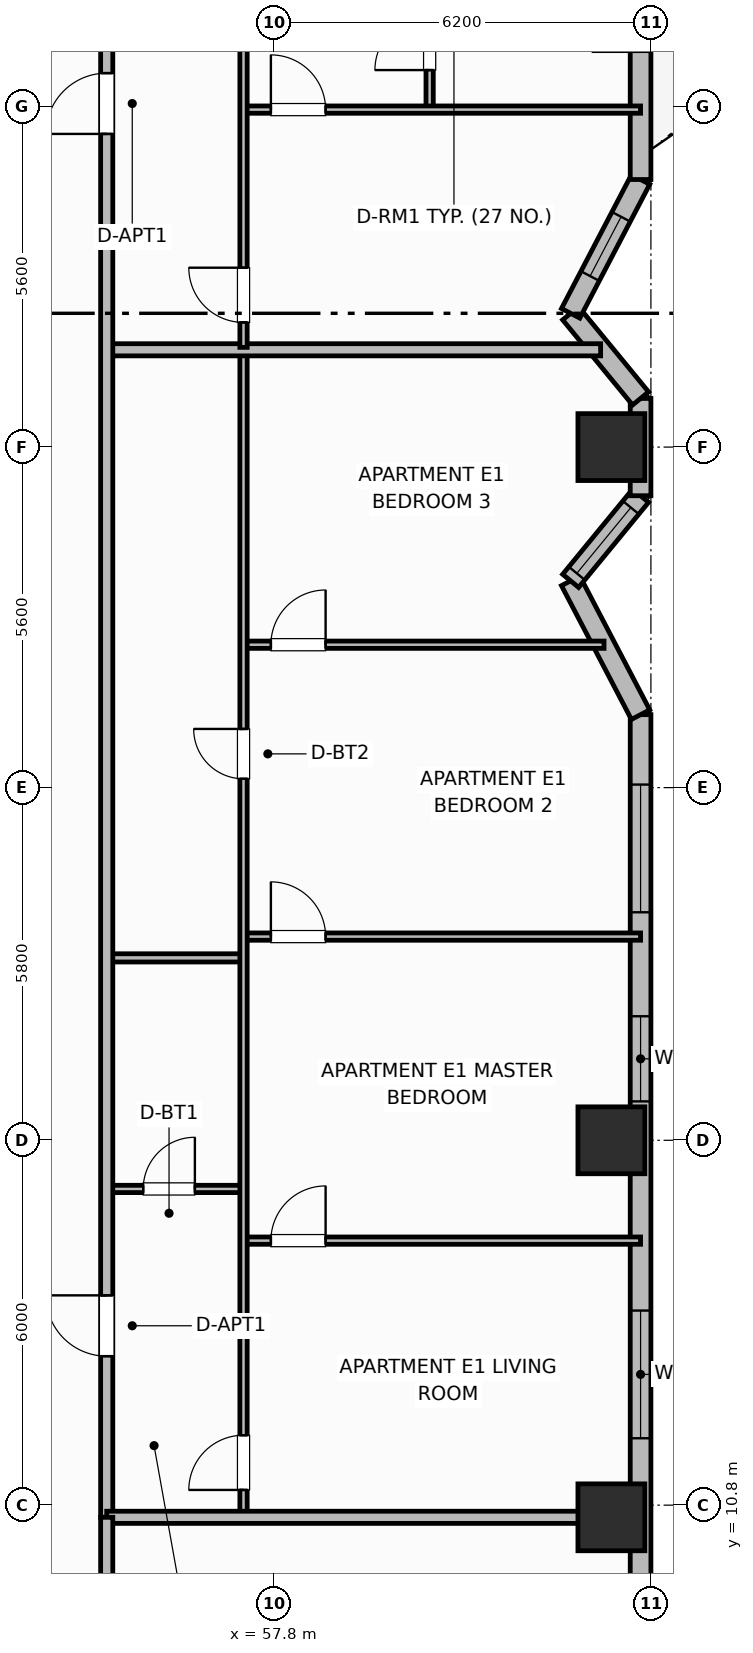
"""IFC4 building model, lengths in metres.
Left out: names, types, materials, properties, quantities, classifications, styles, units other than length and angle.
Written with IfcOpenShell. Run it as: python <this file> out.ifc"""

import sys

from ifc_helpers import new_model, si_unit, direction, frame, frame_2d, origin, origin_2d, place, context, subcontext, project, spatial, rectangle, extrude, element, fill, save


model = new_model("IFC4")
c1 = context("Model", 3, precision=1e-05, world=origin(), true_north=direction((0.0, 1.0)))
c2 = subcontext(c1, "Body", "Model", "MODEL_VIEW")
j1 = project(units=[si_unit("LENGTHUNIT", "METRE"), si_unit("PLANEANGLEUNIT", "RADIAN")], contexts=[c1])
p1 = place(None, origin())
s1 = spatial("IfcSite", under=j1, at=p1, CompositionType="ELEMENT")
p2 = place(p1, origin())
s2 = spatial("IfcBuilding", under=s1, at=p2, CompositionType="ELEMENT")
p3 = place(p2, frame((0.0, 0.0, 132.7)))
s3 = spatial("IfcBuildingStorey", under=s2, at=p3, CompositionType="ELEMENT", Elevation=132.7)
for number, where, z_axis, x_axis in (
    (1, (63.35, 10.6, 0.0), (0.0, 0.0, 1.0), (1.0, 0.0, 0.0)),
    (2, (63.35, 16.8, 0.0), (0.0, 0.0, 1.0), (1.0, 0.0, 0.0)),
    (3, (63.35, 28.2, 0.0), (0.0, 0.0, 1.0), (1.0, 0.0, 0.0)),
):
    element("IfcColumn", number, at=place(p3, frame(where, z_axis=z_axis, x_axis=x_axis)), inside=s3, PredefinedType="COLUMN", context=c2, shape_type="SweptSolid", body=[
        extrude(rectangle(XDim=1.1, YDim=1.1, at=origin_2d()), origin(), (0.0, 0.0, 1.0), 3.7),
    ])
p4 = place(p3, frame((63.83, 9.0, 0.0), z_axis=(0.0, 0.0, 1.0), x_axis=(0.0, 1.0, 0.0)))
e4 = element("IfcWall", 4, at=p4, inside=s3, PredefinedType="SOLIDWALL", context=c2, shape_type="SweptSolid", body=[
    extrude(rectangle(XDim=14.8, YDim=0.34, at=frame_2d((7.4, 0.0))), origin(), (0.0, 0.0, 1.0), 2.66),
])
p5 = place(p4, frame((2.9, 0.0, 0.64)))
e5 = element("IfcOpeningElement", 5, at=p5, cuts=e4, PredefinedType="OPENING", context=c2, shape_type="SweptSolid", body=[
    extrude(rectangle(XDim=2.1, YDim=1.9, at=frame_2d((1.05, 0.95))), frame((0.0, 0.18, 0.0), z_axis=(0.0, -1.0, 0.0), x_axis=(1.0, 0.0, 0.0)), (0.0, 0.0, 1.0), 0.36),
])
p6 = place(p4, frame((8.44, 0.0, 0.65)))
e6 = element("IfcOpeningElement", 6, at=p6, cuts=e4, PredefinedType="OPENING", context=c2, shape_type="SweptSolid", body=[
    extrude(rectangle(XDim=1.4, YDim=1.85, at=frame_2d((0.7, 0.925))), frame((0.0, 0.18, 0.0), z_axis=(0.0, -1.0, 0.0), x_axis=(1.0, 0.0, 0.0)), (0.0, 0.0, 1.0), 0.36),
])
p7 = place(p4, frame((11.55, 0.0, 0.64)))
e7 = element("IfcOpeningElement", 7, at=p7, cuts=e4, PredefinedType="OPENING", context=c2, shape_type="SweptSolid", body=[
    extrude(rectangle(XDim=2.1, YDim=1.9, at=frame_2d((1.05, 0.95))), frame((0.0, 0.18, 0.0), z_axis=(0.0, -1.0, 0.0), x_axis=(1.0, 0.0, 0.0)), (0.0, 0.0, 1.0), 0.36),
])
p8 = place(p3, frame((63.83, 23.8, 0.0), z_axis=(0.0, 0.0, 1.0), x_axis=(-0.463308627993, 0.886196995722, 0.0)))
e8 = element("IfcWall", 8, at=p8, inside=s3, PredefinedType="SOLIDWALL", context=c2, shape_type="SweptSolid", body=[
    extrude(rectangle(XDim=2.482, YDim=0.34, at=frame_2d((1.241, 0.0))), origin(), (0.0, 0.0, 1.0), 2.66),
])
p9 = place(p3, frame((62.68, 26.0, 0.0), z_axis=(0.0, 0.0, 1.0), x_axis=(0.634814134075, 0.772664878961, 0.0)))
e9 = element("IfcWall", 9, at=p9, inside=s3, PredefinedType="SOLIDWALL", context=c2, shape_type="SweptSolid", body=[
    extrude(rectangle(XDim=1.812, YDim=0.34, at=frame_2d((0.906, 0.0))), origin(), (0.0, 0.0, 1.0), 2.66),
])
p10 = place(p9, frame((0.16, 0.0, 0.65)))
e10 = element("IfcOpeningElement", 10, at=p10, cuts=e9, PredefinedType="OPENING", context=c2, shape_type="SweptSolid", body=[
    extrude(rectangle(XDim=1.4, YDim=1.85, at=frame_2d((0.7, 0.925))), frame((0.0, 0.18, 0.0), z_axis=(0.0, -1.0, 0.0), x_axis=(1.0, 0.0, 0.0)), (0.0, 0.0, 1.0), 0.36),
])
p11 = place(p3, frame((63.83, 27.4, 0.0), z_axis=(0.0, 0.0, 1.0), x_axis=(0.0, 1.0, 0.0)))
e11 = element("IfcWall", 11, at=p11, inside=s3, PredefinedType="SOLIDWALL", context=c2, shape_type="SweptSolid", body=[
    extrude(rectangle(XDim=1.6, YDim=0.34, at=frame_2d((0.8, 0.0))), origin(), (0.0, 0.0, 1.0), 2.66),
])
p12 = place(p3, frame((63.83, 29.0, 0.0), z_axis=(0.0, 0.0, 1.0), x_axis=(-0.634814134075, 0.772664878961, 0.0)))
e12 = element("IfcWall", 12, at=p12, inside=s3, PredefinedType="SOLIDWALL", context=c2, shape_type="SweptSolid", body=[
    extrude(rectangle(XDim=1.812, YDim=0.34, at=frame_2d((0.906, 0.0))), origin(), (0.0, 0.0, 1.0), 2.66),
])
p13 = place(p3, frame((62.68, 30.4, 0.0), z_axis=(0.0, 0.0, 1.0), x_axis=(0.46326825181, 0.88621810344, 0.0)))
e13 = element("IfcWall", 13, at=p13, inside=s3, PredefinedType="SOLIDWALL", context=c2, shape_type="SweptSolid", body=[
    extrude(rectangle(XDim=2.483, YDim=0.34, at=frame_2d((1.241, 0.0))), origin(), (0.0, 0.0, 1.0), 2.66),
])
p14 = place(p13, frame((0.691, 0.0, 0.85)))
e14 = element("IfcOpeningElement", 14, at=p14, cuts=e13, PredefinedType="OPENING", context=c2, shape_type="SweptSolid", body=[
    extrude(rectangle(XDim=1.1, YDim=1.65, at=frame_2d((0.55, 0.825))), frame((0.0, 0.18, 0.0), z_axis=(0.0, -1.0, 0.0), x_axis=(1.0, 0.0, 0.0)), (0.0, 0.0, 1.0), 0.36),
])
p15 = place(p3, frame((63.83, 32.6, 0.0), z_axis=(0.0, 0.0, 1.0), x_axis=(0.0, 1.0, 0.0)))
e15 = element("IfcWall", 15, at=p15, inside=s3, PredefinedType="SOLIDWALL", context=c2, shape_type="SweptSolid", body=[
    extrude(rectangle(XDim=14.8, YDim=0.34, at=frame_2d((7.4, 0.0))), origin(), (0.0, 0.0, 1.0), 2.66),
])
p16 = place(p15, frame((2.1, 0.0, 0.0)))
e16 = element("IfcOpeningElement", 16, at=p16, cuts=e15, PredefinedType="OPENING", context=c2, shape_type="SweptSolid", body=[
    extrude(rectangle(XDim=1.6, YDim=2.1, at=frame_2d((0.8, 1.05))), frame((0.0, 0.18, 0.0), z_axis=(0.0, -1.0, 0.0), x_axis=(1.0, 0.0, 0.0)), (0.0, 0.0, 1.0), 0.36),
])
p17 = place(p15, frame((9.238, 0.0, 0.69)))
e17 = element("IfcOpeningElement", 17, at=p17, cuts=e15, PredefinedType="OPENING", context=c2, shape_type="SweptSolid", body=[
    extrude(rectangle(XDim=1.8, YDim=1.85, at=frame_2d((0.9, 0.925))), frame((0.0, 0.18, 0.0), z_axis=(0.0, -1.0, 0.0), x_axis=(1.0, 0.0, 0.0)), (0.0, 0.0, 1.0), 0.36),
])
p18 = place(p3, frame((55.05, 16.0, 0.0), z_axis=(0.0, 0.0, 1.0), x_axis=(1.0, 0.0, 0.0)))
e18 = element("IfcWall", 18, at=p18, inside=s3, PredefinedType="PARTITIONING", context=c2, shape_type="SweptSolid", body=[
    extrude(rectangle(XDim=2.25, YDim=0.12, at=frame_2d((1.125, 0.0))), origin(), (0.0, 0.0, 1.0), 2.49),
])
p19 = place(p18, frame((0.6, 0.0, 0.0)))
e19 = element("IfcOpeningElement", 19, at=p19, cuts=e18, PredefinedType="OPENING", context=c2, shape_type="SweptSolid", body=[
    extrude(rectangle(XDim=0.85, YDim=2.1, at=frame_2d((0.425, 1.05))), frame((0.0, 0.07, 0.0), z_axis=(0.0, -1.0, 0.0), x_axis=(1.0, 0.0, 0.0)), (0.0, 0.0, 1.0), 0.14),
])
p20 = place(p3, frame((55.05, 19.8, 0.0), z_axis=(0.0, 0.0, 1.0), x_axis=(1.0, 0.0, 0.0)))
e20 = element("IfcWall", 20, at=p20, inside=s3, PredefinedType="PARTITIONING", context=c2, shape_type="SweptSolid", body=[
    extrude(rectangle(XDim=2.25, YDim=0.135, at=frame_2d((1.125, 0.0))), origin(), (0.0, 0.0, 1.0), 2.49),
])
p21 = place(p3, frame((57.3, 15.15, 0.0), z_axis=(0.0, 0.0, 1.0), x_axis=(1.0, 0.0, 0.0)))
e21 = element("IfcWall", 21, at=p21, inside=s3, PredefinedType="PARTITIONING", context=c2, shape_type="SweptSolid", body=[
    extrude(rectangle(XDim=6.53, YDim=0.12, at=frame_2d((3.265, 0.0))), origin(), (0.0, 0.0, 1.0), 2.49),
])
p22 = place(p21, frame((0.45, 0.0, 0.0)))
e22 = element("IfcOpeningElement", 22, at=p22, cuts=e21, PredefinedType="OPENING", context=c2, shape_type="SweptSolid", body=[
    extrude(rectangle(XDim=0.9, YDim=2.1, at=frame_2d((0.45, 1.05))), frame((0.0, 0.07, 0.0), z_axis=(0.0, -1.0, 0.0), x_axis=(1.0, 0.0, 0.0)), (0.0, 0.0, 1.0), 0.14),
])
p23 = place(p3, frame((57.3, 20.15, 0.0), z_axis=(0.0, 0.0, 1.0), x_axis=(1.0, 0.0, 0.0)))
e23 = element("IfcWall", 23, at=p23, inside=s3, PredefinedType="PARTITIONING", context=c2, shape_type="SweptSolid", body=[
    extrude(rectangle(XDim=6.53, YDim=0.12, at=frame_2d((3.265, 0.0))), origin(), (0.0, 0.0, 1.0), 2.49),
])
p24 = place(p23, frame((0.45, 0.0, 0.0)))
e24 = element("IfcOpeningElement", 24, at=p24, cuts=e23, PredefinedType="OPENING", context=c2, shape_type="SweptSolid", body=[
    extrude(rectangle(XDim=0.9, YDim=2.1, at=frame_2d((0.45, 1.05))), frame((0.0, 0.07, 0.0), z_axis=(0.0, -1.0, 0.0), x_axis=(1.0, 0.0, 0.0)), (0.0, 0.0, 1.0), 0.14),
])
p25 = place(p3, frame((57.3, 24.95, 0.0), z_axis=(0.0, 0.0, 1.0), x_axis=(1.0, 0.0, 0.0)))
e25 = element("IfcWall", 25, at=p25, inside=s3, PredefinedType="PARTITIONING", context=c2, shape_type="SweptSolid", body=[
    extrude(rectangle(XDim=5.929, YDim=0.12, at=frame_2d((2.964, 0.0))), origin(), (0.0, 0.0, 1.0), 2.49),
])
p26 = place(p25, frame((0.45, 0.0, 0.0)))
e26 = element("IfcOpeningElement", 26, at=p26, cuts=e25, PredefinedType="OPENING", context=c2, shape_type="SweptSolid", body=[
    extrude(rectangle(XDim=0.9, YDim=2.1, at=frame_2d((0.45, 1.05))), frame((0.0, 0.07, 0.0), z_axis=(0.0, -1.0, 0.0), x_axis=(1.0, 0.0, 0.0)), (0.0, 0.0, 1.0), 0.14),
])
p27 = place(p3, frame((57.3, 10.64, 0.0), z_axis=(0.0, 0.0, 1.0), x_axis=(0.0, 1.0, 0.0)))
e27 = element("IfcWall", 27, at=p27, inside=s3, PredefinedType="PARTITIONING", context=c2, shape_type="SweptSolid", body=[
    extrude(rectangle(XDim=19.12, YDim=0.12, at=frame_2d((9.56, 0.0))), origin(), (0.0, 0.0, 1.0), 2.49),
])
p28 = place(p27, frame((0.41, 0.0, 0.0)))
e28 = element("IfcOpeningElement", 28, at=p28, cuts=e27, PredefinedType="OPENING", context=c2, shape_type="SweptSolid", body=[
    extrude(rectangle(XDim=0.9, YDim=2.1, at=frame_2d((0.45, 1.05))), frame((0.0, 0.07, 0.0), z_axis=(0.0, -1.0, 0.0), x_axis=(1.0, 0.0, 0.0)), (0.0, 0.0, 1.0), 0.14),
])
p29 = place(p27, frame((12.105, 0.0, 0.0)))
e29 = element("IfcOpeningElement", 29, at=p29, cuts=e27, PredefinedType="OPENING", context=c2, shape_type="SweptSolid", body=[
    extrude(rectangle(XDim=0.82, YDim=2.08, at=frame_2d((0.41, 1.04))), frame((0.0, 0.07, 0.0), z_axis=(0.0, -1.0, 0.0), x_axis=(1.0, 0.0, 0.0)), (0.0, 0.0, 1.0), 0.14),
])
p30 = place(p3, frame((55.05, 29.8, 0.0), z_axis=(0.0, 0.0, 1.0), x_axis=(1.0, 0.0, 0.0)))
e30 = element("IfcWall", 30, at=p30, inside=s3, PredefinedType="PARTITIONING", context=c2, shape_type="SweptSolid", body=[
    extrude(rectangle(XDim=8.123, YDim=0.2, at=frame_2d((4.062, 0.0))), origin(), (0.0, 0.0, 1.0), 2.49),
])
p31 = place(p3, frame((60.361, 33.79, 0.0), z_axis=(0.0, 0.0, 1.0), x_axis=(0.0, 1.0, 0.0)))
e31 = element("IfcWall", 31, at=p31, inside=s3, PredefinedType="PARTITIONING", context=c2, shape_type="SweptSolid", body=[
    extrude(rectangle(XDim=7.32, YDim=0.12, at=frame_2d((3.66, 0.0))), origin(), (0.0, 0.0, 1.0), 2.49),
])
p32 = place(p31, frame((0.61, 0.0, 0.0)))
e32 = element("IfcOpeningElement", 32, at=p32, cuts=e31, PredefinedType="OPENING", context=c2, shape_type="SweptSolid", body=[
    extrude(rectangle(XDim=0.9, YDim=2.1, at=frame_2d((0.45, 1.05))), frame((0.0, 0.07, 0.0), z_axis=(0.0, -1.0, 0.0), x_axis=(1.0, 0.0, 0.0)), (0.0, 0.0, 1.0), 0.14),
])
p33 = place(p3, frame((57.3, 33.75, 0.0), z_axis=(0.0, 0.0, 1.0), x_axis=(1.0, 0.0, 0.0)))
e33 = element("IfcWall", 33, at=p33, inside=s3, PredefinedType="PARTITIONING", context=c2, shape_type="SweptSolid", body=[
    extrude(rectangle(XDim=6.53, YDim=0.12, at=frame_2d((3.265, 0.0))), origin(), (0.0, 0.0, 1.0), 2.49),
])
p34 = place(p33, frame((0.45, 0.0, 0.0)))
e34 = element("IfcOpeningElement", 34, at=p34, cuts=e33, PredefinedType="OPENING", context=c2, shape_type="SweptSolid", body=[
    extrude(rectangle(XDim=0.9, YDim=2.1, at=frame_2d((0.45, 1.05))), frame((0.0, 0.07, 0.0), z_axis=(0.0, -1.0, 0.0), x_axis=(1.0, 0.0, 0.0)), (0.0, 0.0, 1.0), 0.14),
])
p35 = place(p3, frame((57.3, 29.84, 0.0), z_axis=(0.0, 0.0, 1.0), x_axis=(0.0, 1.0, 0.0)))
e35 = element("IfcWall", 35, at=p35, inside=s3, PredefinedType="PARTITIONING", context=c2, shape_type="SweptSolid", body=[
    extrude(rectangle(XDim=15.92, YDim=0.12, at=frame_2d((7.96, 0.0))), origin(), (0.0, 0.0, 1.0), 2.49),
])
p36 = place(p35, frame((0.41, 0.0, 0.0)))
e36 = element("IfcOpeningElement", 36, at=p36, cuts=e35, PredefinedType="OPENING", context=c2, shape_type="SweptSolid", body=[
    extrude(rectangle(XDim=0.9, YDim=2.1, at=frame_2d((0.45, 1.05))), frame((0.0, 0.07, 0.0), z_axis=(0.0, -1.0, 0.0), x_axis=(1.0, 0.0, 0.0)), (0.0, 0.0, 1.0), 0.14),
])
p37 = place(p35, frame((13.125, 0.0, 0.0)))
e37 = element("IfcOpeningElement", 37, at=p37, cuts=e35, PredefinedType="OPENING", context=c2, shape_type="SweptSolid", body=[
    extrude(rectangle(XDim=0.82, YDim=2.08, at=frame_2d((0.41, 1.04))), frame((0.0, 0.07, 0.0), z_axis=(0.0, -1.0, 0.0), x_axis=(1.0, 0.0, 0.0)), (0.0, 0.0, 1.0), 0.14),
])
p38 = place(p3, frame((55.05, 10.6, 0.0), z_axis=(0.0, 0.0, 1.0), x_axis=(0.0, 1.0, 0.0)))
e38 = element("IfcWall", 38, at=p38, inside=s3, PredefinedType="PARTITIONING", context=c2, shape_type="SweptSolid", body=[
    extrude(rectangle(XDim=35.2, YDim=0.2, at=frame_2d((17.6, 0.0))), origin(), (0.0, 0.0, 1.0), 2.49),
])
p39 = place(p38, frame((2.65, 0.0, 0.0)))
e39 = element("IfcOpeningElement", 39, at=p39, cuts=e38, PredefinedType="OPENING", context=c2, shape_type="SweptSolid", body=[
    extrude(rectangle(XDim=1.0, YDim=2.15, at=frame_2d((0.5, 1.075))), frame((0.0, 0.11, 0.0), z_axis=(0.0, -1.0, 0.0), x_axis=(1.0, 0.0, 0.0)), (0.0, 0.0, 1.0), 0.22),
])
p40 = place(p38, frame((22.75, 0.0, 0.0)))
e40 = element("IfcOpeningElement", 40, at=p40, cuts=e38, PredefinedType="OPENING", context=c2, shape_type="SweptSolid", body=[
    extrude(rectangle(XDim=1.0, YDim=2.15, at=frame_2d((0.5, 1.075))), frame((0.0, 0.11, 0.0), z_axis=(0.0, -1.0, 0.0), x_axis=(1.0, 0.0, 0.0)), (0.0, 0.0, 1.0), 0.22),
])
p41 = place(p3, frame((55.05, 10.6, 0.0), z_axis=(0.0, 0.0, 1.0), x_axis=(1.0, 0.0, 0.0)))
e41 = element("IfcWall", 41, at=p41, inside=s3, PredefinedType="PARTITIONING", context=c2, shape_type="SweptSolid", body=[
    extrude(rectangle(XDim=8.36, YDim=0.2, at=frame_2d((4.18, 0.0))), origin(), (0.0, 0.0, 1.0), 2.49),
])
p42 = place(p3, frame((55.05, 4.97, 0.0), z_axis=(0.0, 0.0, 1.0), x_axis=(0.0, 1.0, 0.0)))
e42 = element("IfcWall", 42, at=p42, inside=s3, PredefinedType="PARTITIONING", context=c2, shape_type="SweptSolid", body=[
    extrude(rectangle(XDim=5.63, YDim=0.2, at=frame_2d((2.815, 0.0))), origin(), (0.0, 0.0, 1.0), 2.49),
])
p43 = place(p5, origin())
e43 = element("IfcWindow", 43, at=p43, inside=s3, PartitioningType="SINGLE_PANEL", PredefinedType="WINDOW", context=c2, shape_type="SweptSolid", body=[
    extrude(rectangle(XDim=2.1, YDim=1.9, at=frame_2d((1.05, 0.95))), frame((0.0, 0.03, 0.0), z_axis=(0.0, -1.0, 0.0), x_axis=(1.0, 0.0, 0.0)), (0.0, 0.0, 1.0), 0.06),
])
fill(e5, e43)
p44 = place(p6, origin())
e44 = element("IfcWindow", 44, at=p44, inside=s3, PartitioningType="SINGLE_PANEL", PredefinedType="WINDOW", context=c2, shape_type="SweptSolid", body=[
    extrude(rectangle(XDim=1.4, YDim=1.85, at=frame_2d((0.7, 0.925))), frame((0.0, 0.03, 0.0), z_axis=(0.0, -1.0, 0.0), x_axis=(1.0, 0.0, 0.0)), (0.0, 0.0, 1.0), 0.06),
])
fill(e6, e44)
p45 = place(p7, origin())
e45 = element("IfcWindow", 45, at=p45, inside=s3, PartitioningType="SINGLE_PANEL", PredefinedType="WINDOW", context=c2, shape_type="SweptSolid", body=[
    extrude(rectangle(XDim=2.1, YDim=1.9, at=frame_2d((1.05, 0.95))), frame((0.0, 0.03, 0.0), z_axis=(0.0, -1.0, 0.0), x_axis=(1.0, 0.0, 0.0)), (0.0, 0.0, 1.0), 0.06),
])
fill(e7, e45)
p46 = place(p10, origin())
e46 = element("IfcWindow", 46, at=p46, inside=s3, PartitioningType="SINGLE_PANEL", PredefinedType="WINDOW", context=c2, shape_type="SweptSolid", body=[
    extrude(rectangle(XDim=1.4, YDim=1.85, at=frame_2d((0.7, 0.925))), frame((0.0, 0.03, 0.0), z_axis=(0.0, -1.0, 0.0), x_axis=(1.0, 0.0, 0.0)), (0.0, 0.0, 1.0), 0.06),
])
fill(e10, e46)
p47 = place(p14, origin())
e47 = element("IfcWindow", 47, at=p47, inside=s3, PartitioningType="SINGLE_PANEL", PredefinedType="WINDOW", context=c2, shape_type="SweptSolid", body=[
    extrude(rectangle(XDim=1.1, YDim=1.65, at=frame_2d((0.55, 0.825))), frame((0.0, 0.03, 0.0), z_axis=(0.0, -1.0, 0.0), x_axis=(1.0, 0.0, 0.0)), (0.0, 0.0, 1.0), 0.06),
])
fill(e14, e47)
p48 = place(p19, origin())
e48 = element("IfcDoor", 48, at=p48, inside=s3, OperationType="SINGLE_SWING_RIGHT", PredefinedType="DOOR", context=c2, shape_type="SweptSolid", body=[
    extrude(rectangle(XDim=0.85, YDim=2.1, at=frame_2d((0.425, 1.05))), frame((0.0, 0.025, 0.0), z_axis=(0.0, -1.0, 0.0), x_axis=(1.0, 0.0, 0.0)), (0.0, 0.0, 1.0), 0.05),
])
fill(e19, e48)
p49 = place(p22, origin())
e49 = element("IfcDoor", 49, at=p49, inside=s3, OperationType="SINGLE_SWING_RIGHT", PredefinedType="DOOR", context=c2, shape_type="SweptSolid", body=[
    extrude(rectangle(XDim=0.9, YDim=2.1, at=frame_2d((0.45, 1.05))), frame((0.0, 0.025, 0.0), z_axis=(0.0, -1.0, 0.0), x_axis=(1.0, 0.0, 0.0)), (0.0, 0.0, 1.0), 0.05),
])
fill(e22, e49)
p50 = place(p24, origin())
e50 = element("IfcDoor", 50, at=p50, inside=s3, OperationType="SINGLE_SWING_LEFT", PredefinedType="DOOR", context=c2, shape_type="SweptSolid", body=[
    extrude(rectangle(XDim=0.9, YDim=2.1, at=frame_2d((0.45, 1.05))), frame((0.0, 0.025, 0.0), z_axis=(0.0, -1.0, 0.0), x_axis=(1.0, 0.0, 0.0)), (0.0, 0.0, 1.0), 0.05),
])
fill(e24, e50)
p51 = place(p26, origin())
e51 = element("IfcDoor", 51, at=p51, inside=s3, OperationType="SINGLE_SWING_RIGHT", PredefinedType="DOOR", context=c2, shape_type="SweptSolid", body=[
    extrude(rectangle(XDim=0.9, YDim=2.1, at=frame_2d((0.45, 1.05))), frame((0.0, 0.025, 0.0), z_axis=(0.0, -1.0, 0.0), x_axis=(1.0, 0.0, 0.0)), (0.0, 0.0, 1.0), 0.05),
])
fill(e26, e51)
p52 = place(p28, origin())
e52 = element("IfcDoor", 52, at=p52, inside=s3, OperationType="SINGLE_SWING_LEFT", PredefinedType="DOOR", context=c2, shape_type="SweptSolid", body=[
    extrude(rectangle(XDim=0.9, YDim=2.1, at=frame_2d((0.45, 1.05))), frame((0.0, 0.025, 0.0), z_axis=(0.0, -1.0, 0.0), x_axis=(1.0, 0.0, 0.0)), (0.0, 0.0, 1.0), 0.05),
])
fill(e28, e52)
p53 = place(p29, origin())
e53 = element("IfcDoor", 53, at=p53, inside=s3, OperationType="SINGLE_SWING_RIGHT", PredefinedType="DOOR", context=c2, shape_type="SweptSolid", body=[
    extrude(rectangle(XDim=0.82, YDim=2.08, at=frame_2d((0.41, 1.04))), frame((0.0, 0.025, 0.0), z_axis=(0.0, -1.0, 0.0), x_axis=(1.0, 0.0, 0.0)), (0.0, 0.0, 1.0), 0.05),
])
fill(e29, e53)
p54 = place(p32, origin())
e54 = element("IfcDoor", 54, at=p54, inside=s3, OperationType="SINGLE_SWING_LEFT", PredefinedType="DOOR", context=c2, shape_type="SweptSolid", body=[
    extrude(rectangle(XDim=0.9, YDim=2.1, at=frame_2d((0.45, 1.05))), frame((0.0, 0.025, 0.0), z_axis=(0.0, -1.0, 0.0), x_axis=(1.0, 0.0, 0.0)), (0.0, 0.0, 1.0), 0.05),
])
fill(e32, e54)
p55 = place(p34, origin())
e55 = element("IfcDoor", 55, at=p55, inside=s3, OperationType="SINGLE_SWING_LEFT", PredefinedType="DOOR", context=c2, shape_type="SweptSolid", body=[
    extrude(rectangle(XDim=0.9, YDim=2.1, at=frame_2d((0.45, 1.05))), frame((0.0, 0.025, 0.0), z_axis=(0.0, -1.0, 0.0), x_axis=(1.0, 0.0, 0.0)), (0.0, 0.0, 1.0), 0.05),
])
fill(e34, e55)
p56 = place(p36, origin())
e56 = element("IfcDoor", 56, at=p56, inside=s3, OperationType="SINGLE_SWING_RIGHT", PredefinedType="DOOR", context=c2, shape_type="SweptSolid", body=[
    extrude(rectangle(XDim=0.9, YDim=2.1, at=frame_2d((0.45, 1.05))), frame((0.0, 0.025, 0.0), z_axis=(0.0, -1.0, 0.0), x_axis=(1.0, 0.0, 0.0)), (0.0, 0.0, 1.0), 0.05),
])
fill(e36, e56)
p57 = place(p39, origin())
e57 = element("IfcDoor", 57, at=p57, inside=s3, OperationType="SINGLE_SWING_RIGHT", PredefinedType="DOOR", context=c2, shape_type="SweptSolid", body=[
    extrude(rectangle(XDim=1.0, YDim=2.15, at=frame_2d((0.5, 1.075))), frame((0.0, 0.025, 0.0), z_axis=(0.0, -1.0, 0.0), x_axis=(1.0, 0.0, 0.0)), (0.0, 0.0, 1.0), 0.05),
])
fill(e39, e57)
p58 = place(p40, origin())
e58 = element("IfcDoor", 58, at=p58, inside=s3, OperationType="SINGLE_SWING_LEFT", PredefinedType="DOOR", context=c2, shape_type="SweptSolid", body=[
    extrude(rectangle(XDim=1.0, YDim=2.15, at=frame_2d((0.5, 1.075))), frame((0.0, 0.025, 0.0), z_axis=(0.0, -1.0, 0.0), x_axis=(1.0, 0.0, 0.0)), (0.0, 0.0, 1.0), 0.05),
])
fill(e40, e58)
save(model, sys.argv[1])
